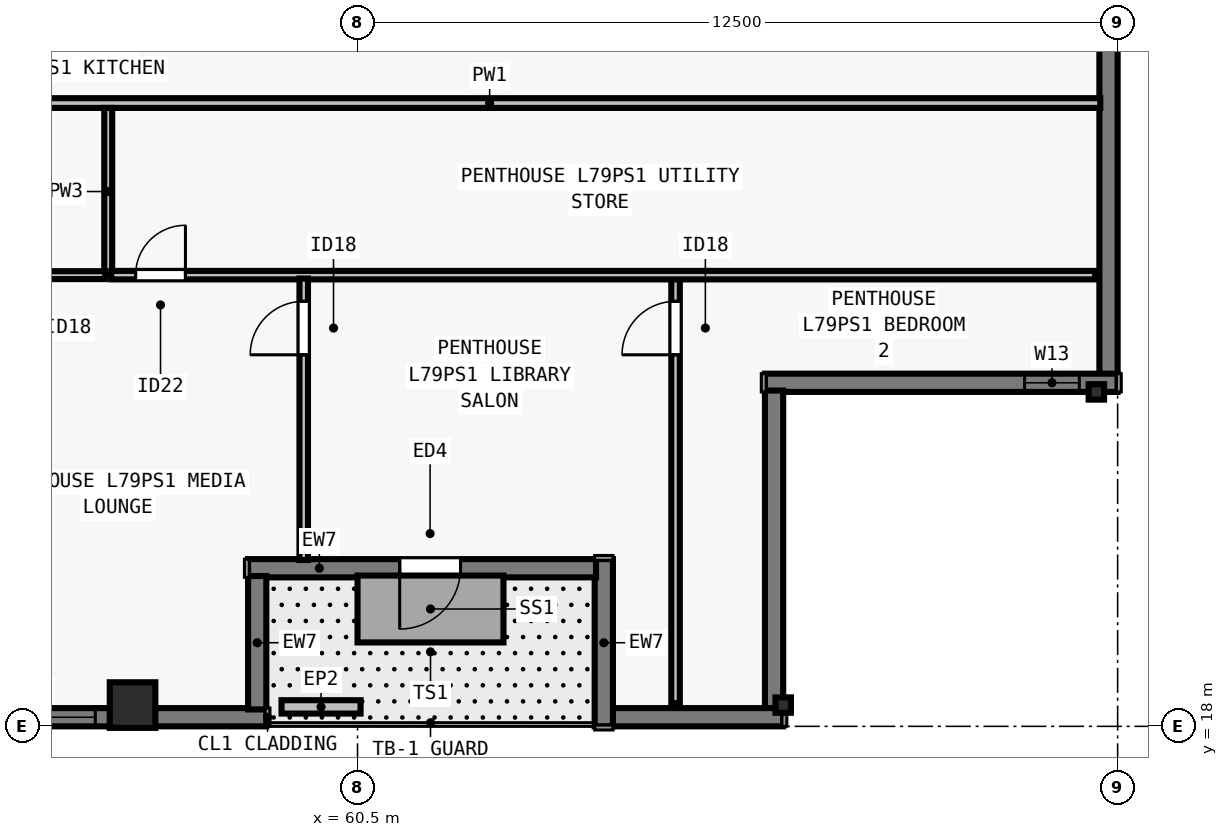
"""IFC4 building model, lengths in metres.
Left out: names, types, materials, properties, quantities, classifications, styles, units other than length and angle.
Written with IfcOpenShell. Run it as: python <this file> out.ifc"""

import sys

from ifc_helpers import new_model, si_unit, direction, frame, frame_2d, origin, origin_2d, place, context, subcontext, project, spatial, rectangle, i_section, extrude, element, fill, save


model = new_model("IFC4")
c1 = context("Model", 3, precision=1e-05, world=origin(), true_north=direction((0.0, 1.0)))
c2 = subcontext(c1, "Body", "Model", "MODEL_VIEW")
j1 = project(units=[si_unit("LENGTHUNIT", "METRE"), si_unit("PLANEANGLEUNIT", "RADIAN")], contexts=[c1])
p1 = place(None, origin())
s1 = spatial("IfcSite", under=j1, at=p1, CompositionType="ELEMENT")
p2 = place(p1, origin())
s2 = spatial("IfcBuilding", under=s1, at=p2, CompositionType="ELEMENT")
p3 = place(p2, frame((0.0, 0.0, 287.5)))
s3 = spatial("IfcBuildingStorey", under=s2, at=p3, CompositionType="ELEMENT", Elevation=287.5)
p4 = place(p3, frame((56.8, 18.35, 0.0), z_axis=(0.0, 0.0, 1.0), x_axis=(1.0, 0.0, 0.0)))
e1 = element("IfcColumn", 1, at=p4, inside=s3, PredefinedType="COLUMN", context=c2, shape_type="SweptSolid", body=[
    extrude(rectangle(XDim=0.75, YDim=0.75, at=origin_2d()), origin(), (0.0, 0.0, 1.0), 3.5),
])
for number, where, z_axis, x_axis in (
    (2, (67.5, 18.35, 0.0), (0.0, 0.0, 1.0), (1.0, 0.0, 0.0)),
    (3, (72.65, 23.5, 0.0), (0.0, 0.0, 1.0), (0.0, 1.0, 0.0)),
):
    element("IfcColumn", number, at=place(p3, frame(where, z_axis=z_axis, x_axis=x_axis)), inside=s3, PredefinedType="COLUMN", context=c2, shape_type="SweptSolid", body=[
        extrude(i_section(OverallWidth=0.254, OverallDepth=0.254, WebThickness=0.009, FlangeThickness=0.014, FilletRadius=0.013, at=origin_2d()), origin(), (0.0, 0.0, 1.0), 3.5),
    ])
p5 = place(p3, frame((59.0, 18.15, 0.0), z_axis=(0.0, 0.0, 1.0), x_axis=(-1.0, 0.0, 0.0)))
e4 = element("IfcWall", 4, at=p5, inside=s3, PredefinedType="SOLIDWALL", context=c2, shape_type="SweptSolid", body=[
    extrude(rectangle(XDim=22.222, YDim=0.3, at=frame_2d((11.111, 0.0))), origin(), (0.0, 0.0, 1.0), 3.29),
])
p6 = place(p5, frame((2.812, 0.0, 0.8)))
e5 = element("IfcOpeningElement", 5, at=p6, cuts=e4, PredefinedType="OPENING", context=c2, shape_type="SweptSolid", body=[
    extrude(rectangle(XDim=2.0, YDim=1.758, at=frame_2d((1.0, 0.879))), frame((0.0, 0.16, 0.0), z_axis=(0.0, -1.0, 0.0), x_axis=(1.0, 0.0, 0.0)), (0.0, 0.0, 1.0), 0.32),
])
p7 = place(p5, frame((6.012, 0.0, 0.8)))
e6 = element("IfcOpeningElement", 6, at=p7, cuts=e4, PredefinedType="OPENING", context=c2, shape_type="SweptSolid", body=[
    extrude(rectangle(XDim=1.65, YDim=1.758, at=frame_2d((0.825, 0.879))), frame((0.0, 0.16, 0.0), z_axis=(0.0, -1.0, 0.0), x_axis=(1.0, 0.0, 0.0)), (0.0, 0.0, 1.0), 0.32),
])
p8 = place(p5, frame((8.811, 0.0, 0.8)))
e7 = element("IfcOpeningElement", 7, at=p8, cuts=e4, PredefinedType="OPENING", context=c2, shape_type="SweptSolid", body=[
    extrude(rectangle(XDim=2.0, YDim=1.758, at=frame_2d((1.0, 0.879))), frame((0.0, 0.16, 0.0), z_axis=(0.0, -1.0, 0.0), x_axis=(1.0, 0.0, 0.0)), (0.0, 0.0, 1.0), 0.32),
])
p9 = place(p5, frame((12.41, 0.0, 0.8)))
e8 = element("IfcOpeningElement", 8, at=p9, cuts=e4, PredefinedType="OPENING", context=c2, shape_type="SweptSolid", body=[
    extrude(rectangle(XDim=1.65, YDim=1.758, at=frame_2d((0.825, 0.879))), frame((0.0, 0.16, 0.0), z_axis=(0.0, -1.0, 0.0), x_axis=(1.0, 0.0, 0.0)), (0.0, 0.0, 1.0), 0.32),
])
p10 = place(p5, frame((15.66, 0.0, 0.8)))
e9 = element("IfcOpeningElement", 9, at=p10, cuts=e4, PredefinedType="OPENING", context=c2, shape_type="SweptSolid", body=[
    extrude(rectangle(XDim=2.0, YDim=1.758, at=frame_2d((1.0, 0.879))), frame((0.0, 0.16, 0.0), z_axis=(0.0, -1.0, 0.0), x_axis=(1.0, 0.0, 0.0)), (0.0, 0.0, 1.0), 0.32),
])
p11 = place(p3, frame((72.85, 54.5, 0.0), z_axis=(0.0, 0.0, 1.0), x_axis=(0.0, -1.0, 0.0)))
e10 = element("IfcWall", 10, at=p11, inside=s3, PredefinedType="SOLIDWALL", context=c2, shape_type="SweptSolid", body=[
    extrude(rectangle(XDim=30.722, YDim=0.3, at=frame_2d((15.361, 0.0))), origin(), (0.0, 0.0, 1.0), 3.29),
])
p12 = place(p11, frame((8.331, 0.0, 0.8)))
e11 = element("IfcOpeningElement", 11, at=p12, cuts=e10, PredefinedType="OPENING", context=c2, shape_type="SweptSolid", body=[
    extrude(rectangle(XDim=1.65, YDim=1.758, at=frame_2d((0.825, 0.879))), frame((0.0, 0.16, 0.0), z_axis=(0.0, -1.0, 0.0), x_axis=(1.0, 0.0, 0.0)), (0.0, 0.0, 1.0), 0.32),
])
p13 = place(p11, frame((11.593, 0.0, 0.8)))
e12 = element("IfcOpeningElement", 12, at=p13, cuts=e10, PredefinedType="OPENING", context=c2, shape_type="SweptSolid", body=[
    extrude(rectangle(XDim=2.0, YDim=1.758, at=frame_2d((1.0, 0.879))), frame((0.0, 0.16, 0.0), z_axis=(0.0, -1.0, 0.0), x_axis=(1.0, 0.0, 0.0)), (0.0, 0.0, 1.0), 0.32),
])
p14 = place(p11, frame((16.455, 0.0, 0.8)))
e13 = element("IfcOpeningElement", 13, at=p14, cuts=e10, PredefinedType="OPENING", context=c2, shape_type="SweptSolid", body=[
    extrude(rectangle(XDim=1.65, YDim=1.758, at=frame_2d((0.825, 0.879))), frame((0.0, 0.16, 0.0), z_axis=(0.0, -1.0, 0.0), x_axis=(1.0, 0.0, 0.0)), (0.0, 0.0, 1.0), 0.32),
])
p15 = place(p11, frame((20.967, 0.0, 0.8)))
e14 = element("IfcOpeningElement", 14, at=p15, cuts=e10, PredefinedType="OPENING", context=c2, shape_type="SweptSolid", body=[
    extrude(rectangle(XDim=2.0, YDim=1.758, at=frame_2d((1.0, 0.879))), frame((0.0, 0.16, 0.0), z_axis=(0.0, -1.0, 0.0), x_axis=(1.0, 0.0, 0.0)), (0.0, 0.0, 1.0), 0.32),
])
p16 = place(p3, frame((73.0, 23.65, 0.0), z_axis=(0.0, 0.0, 1.0), x_axis=(-1.0, 0.0, 0.0)))
e15 = element("IfcWall", 15, at=p16, inside=s3, PredefinedType="SOLIDWALL", context=c2, shape_type="SweptSolid", body=[
    extrude(rectangle(XDim=5.8, YDim=0.3, at=frame_2d((2.9, 0.0))), origin(), (0.0, 0.0, 1.0), 3.29),
])
p17 = place(p16, frame((0.63, 0.0, 0.8)))
e16 = element("IfcOpeningElement", 16, at=p17, cuts=e15, PredefinedType="OPENING", context=c2, shape_type="SweptSolid", body=[
    extrude(rectangle(XDim=0.9, YDim=1.75, at=frame_2d((0.45, 0.875))), frame((0.0, 0.16, 0.0), z_axis=(0.0, -1.0, 0.0), x_axis=(1.0, 0.0, 0.0)), (0.0, 0.0, 1.0), 0.32),
])
p18 = place(p3, frame((67.35, 23.522, 0.0), z_axis=(0.0, 0.0, 1.0), x_axis=(0.0, -1.0, 0.0)))
e17 = element("IfcWall", 17, at=p18, inside=s3, PredefinedType="SOLIDWALL", context=c2, shape_type="SweptSolid", body=[
    extrude(rectangle(XDim=5.244, YDim=0.3, at=frame_2d((2.622, 0.0))), origin(), (0.0, 0.0, 1.0), 3.29),
])
p19 = place(p3, frame((67.5, 18.15, 0.0), z_axis=(0.0, 0.0, 1.0), x_axis=(-1.0, 0.0, 0.0)))
e18 = element("IfcWall", 18, at=p19, inside=s3, PredefinedType="SOLIDWALL", context=c2, shape_type="SweptSolid", body=[
    extrude(rectangle(XDim=2.822, YDim=0.3, at=frame_2d((1.411, 0.0))), origin(), (0.0, 0.0, 1.0), 3.29),
])
p20 = place(p3, frame((64.55, 18.0, 0.0), z_axis=(0.0, 0.0, 1.0), x_axis=(0.0, 1.0, 0.0)))
e19 = element("IfcWall", 19, at=p20, inside=s3, PredefinedType="SOLIDWALL", context=c2, shape_type="SweptSolid", body=[
    extrude(rectangle(XDim=2.75, YDim=0.3, at=frame_2d((1.375, 0.0))), origin(), (0.0, 0.0, 1.0), 3.29),
])
p21 = place(p3, frame((64.422, 20.6, 0.0), z_axis=(0.0, 0.0, 1.0), x_axis=(-1.0, 0.0, 0.0)))
e20 = element("IfcWall", 20, at=p21, inside=s3, PredefinedType="SOLIDWALL", context=c2, shape_type="SweptSolid", body=[
    extrude(rectangle(XDim=5.722, YDim=0.3, at=frame_2d((2.861, 0.0))), origin(), (0.0, 0.0, 1.0), 3.29),
])
p22 = place(p21, frame((2.229, 0.0, 0.0)))
e21 = element("IfcOpeningElement", 21, at=p22, cuts=e20, PredefinedType="OPENING", context=c2, shape_type="SweptSolid", body=[
    extrude(rectangle(XDim=1.0, YDim=2.15, at=frame_2d((0.5, 1.075))), frame((0.0, 0.16, 0.0), z_axis=(0.0, -1.0, 0.0), x_axis=(1.0, 0.0, 0.0)), (0.0, 0.0, 1.0), 0.32),
])
p23 = place(p3, frame((58.85, 20.472, 0.0), z_axis=(0.0, 0.0, 1.0), x_axis=(0.0, -1.0, 0.0)))
e22 = element("IfcWall", 22, at=p23, inside=s3, PredefinedType="SOLIDWALL", context=c2, shape_type="SweptSolid", body=[
    extrude(rectangle(XDim=2.194, YDim=0.3, at=frame_2d((1.097, 0.0))), origin(), (0.0, 0.0, 1.0), 3.29),
])
p24 = place(p3, frame((59.25, 18.32, 0.0), z_axis=(0.0, 0.0, 1.0), x_axis=(1.0, 0.0, 0.0)))
e23 = element("IfcWall", 23, at=p24, inside=s3, PredefinedType="PARAPET", context=c2, shape_type="SweptSolid", body=[
    extrude(rectangle(XDim=1.3, YDim=0.22, at=frame_2d((0.65, 0.0))), origin(), (0.0, 0.0, 1.0), 0.55),
])
p25 = place(p3, frame((31.285, 28.25, 0.0), z_axis=(0.0, 0.0, 1.0), x_axis=(1.0, 0.0, 0.0)))
e24 = element("IfcWall", 24, at=p25, inside=s3, PredefinedType="PARTITIONING", context=c2, shape_type="SweptSolid", body=[
    extrude(rectangle(XDim=41.43, YDim=0.16, at=frame_2d((20.715, 0.0))), origin(), (0.0, 0.0, 1.0), 3.009),
])
p26 = place(p25, frame((20.235, 0.0, 0.0)))
e25 = element("IfcOpeningElement", 25, at=p26, cuts=e24, PredefinedType="OPENING", context=c2, shape_type="SweptSolid", body=[
    extrude(rectangle(XDim=0.96, YDim=2.18, at=frame_2d((0.48, 1.09))), frame((0.0, 0.09, 0.0), z_axis=(0.0, -1.0, 0.0), x_axis=(1.0, 0.0, 0.0)), (0.0, 0.0, 1.0), 0.18),
])
p27 = place(p3, frame((56.4, 25.42, 0.0), z_axis=(0.0, 0.0, 1.0), x_axis=(0.0, 1.0, 0.0)))
e26 = element("IfcWall", 26, at=p27, inside=s3, PredefinedType="PLUMBINGWALL", context=c2, shape_type="SweptSolid", body=[
    extrude(rectangle(XDim=2.75, YDim=0.13, at=frame_2d((1.375, 0.0))), origin(), (0.0, 0.0, 1.0), 3.29),
])
p28 = place(p3, frame((53.2, 25.42, 0.0), z_axis=(0.0, 0.0, 1.0), x_axis=(1.0, 0.0, 0.0)))
e27 = element("IfcWall", 27, at=p28, inside=s3, PredefinedType="PLUMBINGWALL", context=c2, shape_type="SweptSolid", body=[
    extrude(rectangle(XDim=3.15, YDim=0.13, at=frame_2d((1.575, 0.0))), origin(), (0.0, 0.0, 1.0), 3.29),
])
p29 = place(p3, frame((65.73, 18.38, 0.0), z_axis=(0.0, 0.0, 1.0), x_axis=(0.0, 1.0, 0.0)))
e28 = element("IfcWall", 28, at=p29, inside=s3, PredefinedType="PARTITIONING", context=c2, shape_type="SweptSolid", body=[
    extrude(rectangle(XDim=7.08, YDim=0.14, at=frame_2d((3.54, 0.0))), origin(), (0.0, 0.0, 1.0), 2.653),
])
p30 = place(p29, frame((5.73, 0.0, 0.0)))
e29 = element("IfcOpeningElement", 29, at=p30, cuts=e28, PredefinedType="OPENING", context=c2, shape_type="SweptSolid", body=[
    extrude(rectangle(XDim=0.88, YDim=2.1, at=frame_2d((0.44, 1.05))), frame((0.0, 0.08, 0.0), z_axis=(0.0, -1.0, 0.0), x_axis=(1.0, 0.0, 0.0)), (0.0, 0.0, 1.0), 0.16),
])
p31 = place(p3, frame((56.45, 25.42, 0.0), z_axis=(0.0, 0.0, 1.0), x_axis=(1.0, 0.0, 0.0)))
e30 = element("IfcWall", 30, at=p31, inside=s3, PredefinedType="PARTITIONING", context=c2, shape_type="SweptSolid", body=[
    extrude(rectangle(XDim=16.18, YDim=0.14, at=frame_2d((8.09, 0.0))), origin(), (0.0, 0.0, 1.0), 3.009),
])
p32 = place(p31, frame((0.4, 0.0, 0.0)))
e31 = element("IfcOpeningElement", 31, at=p32, cuts=e30, PredefinedType="OPENING", context=c2, shape_type="SweptSolid", body=[
    extrude(rectangle(XDim=0.82, YDim=2.1, at=frame_2d((0.41, 1.05))), frame((0.0, 0.08, 0.0), z_axis=(0.0, -1.0, 0.0), x_axis=(1.0, 0.0, 0.0)), (0.0, 0.0, 1.0), 0.16),
])
p33 = place(p3, frame((59.615, 20.735, 0.0), z_axis=(0.0, 0.0, 1.0), x_axis=(0.0, 1.0, 0.0)))
e32 = element("IfcWall", 32, at=p33, inside=s3, PredefinedType="PARTITIONING", context=c2, shape_type="SweptSolid", body=[
    extrude(rectangle(XDim=4.63, YDim=0.14, at=frame_2d((2.315, 0.0))), origin(), (0.0, 0.0, 1.0), 3.29),
])
p34 = place(p33, frame((3.375, 0.0, 0.0)))
e33 = element("IfcOpeningElement", 33, at=p34, cuts=e32, PredefinedType="OPENING", context=c2, shape_type="SweptSolid", body=[
    extrude(rectangle(XDim=0.88, YDim=2.1, at=frame_2d((0.44, 1.05))), frame((0.0, 0.08, 0.0), z_axis=(0.0, -1.0, 0.0), x_axis=(1.0, 0.0, 0.0)), (0.0, 0.0, 1.0), 0.16),
])
p35 = place(p6, origin())
e34 = element("IfcWindow", 34, at=p35, inside=s3, PartitioningType="SINGLE_PANEL", PredefinedType="WINDOW", context=c2, shape_type="SweptSolid", body=[
    extrude(rectangle(XDim=2.0, YDim=1.758, at=frame_2d((1.0, 0.879))), frame((0.0, -0.05, 0.0), z_axis=(0.0, -1.0, 0.0), x_axis=(1.0, 0.0, 0.0)), (0.0, 0.0, 1.0), 0.06),
])
fill(e5, e34)
p36 = place(p22, origin())
e35 = element("IfcDoor", 35, at=p36, inside=s3, OperationType="SINGLE_SWING_RIGHT", PredefinedType="DOOR", context=c2, shape_type="SweptSolid", body=[
    extrude(rectangle(XDim=1.0, YDim=2.15, at=frame_2d((0.5, 1.075))), frame((0.0, 0.025, 0.0), z_axis=(0.0, -1.0, 0.0), x_axis=(1.0, 0.0, 0.0)), (0.0, 0.0, 1.0), 0.05),
])
fill(e21, e35)
p37 = place(p17, origin())
e36 = element("IfcWindow", 36, at=p37, inside=s3, PartitioningType="SINGLE_PANEL", PredefinedType="WINDOW", context=c2, shape_type="SweptSolid", body=[
    extrude(rectangle(XDim=0.9, YDim=1.75, at=frame_2d((0.45, 0.875))), frame((0.0, -0.04, 0.0), z_axis=(0.0, -1.0, 0.0), x_axis=(1.0, 0.0, 0.0)), (0.0, 0.0, 1.0), 0.06),
])
fill(e16, e36)
p38 = place(p32, origin())
e37 = element("IfcDoor", 37, at=p38, inside=s3, OperationType="SINGLE_SWING_RIGHT", PredefinedType="DOOR", context=c2, shape_type="SweptSolid", body=[
    extrude(rectangle(XDim=0.82, YDim=2.1, at=frame_2d((0.41, 1.05))), frame((0.0, 0.025, 0.0), z_axis=(0.0, -1.0, 0.0), x_axis=(1.0, 0.0, 0.0)), (0.0, 0.0, 1.0), 0.05),
])
fill(e31, e37)
p39 = place(p30, origin())
e38 = element("IfcDoor", 38, at=p39, inside=s3, OperationType="SINGLE_SWING_LEFT", PredefinedType="DOOR", context=c2, shape_type="SweptSolid", body=[
    extrude(rectangle(XDim=0.88, YDim=2.1, at=frame_2d((0.44, 1.05))), frame((0.0, 0.025, 0.0), z_axis=(0.0, -1.0, 0.0), x_axis=(1.0, 0.0, 0.0)), (0.0, 0.0, 1.0), 0.05),
])
fill(e29, e38)
p40 = place(p34, origin())
e39 = element("IfcDoor", 39, at=p40, inside=s3, OperationType="SINGLE_SWING_LEFT", PredefinedType="DOOR", context=c2, shape_type="SweptSolid", body=[
    extrude(rectangle(XDim=0.88, YDim=2.1, at=frame_2d((0.44, 1.05))), frame((0.0, 0.025, 0.0), z_axis=(0.0, -1.0, 0.0), x_axis=(1.0, 0.0, 0.0)), (0.0, 0.0, 1.0), 0.05),
])
fill(e33, e39)
save(model, sys.argv[1])
